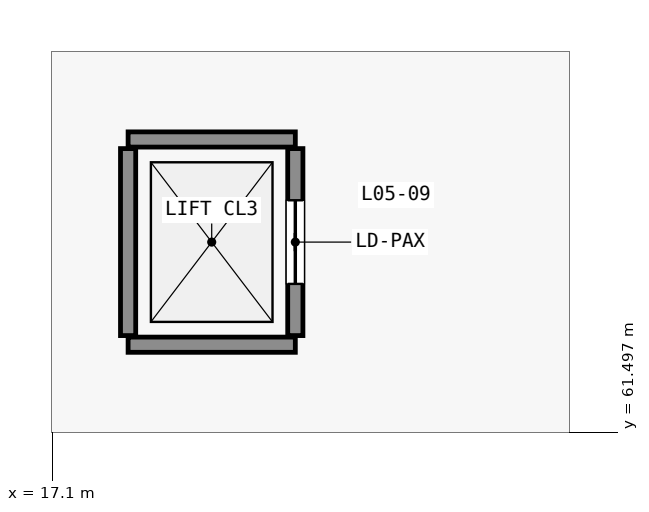
"""IFC4 building model, lengths in metres.
Left out: names, types, materials, properties, quantities, classifications, styles, units other than length and angle.
Written with IfcOpenShell. Run it as: python <this file> out.ifc"""

import sys

from ifc_helpers import new_model, si_unit, direction, frame, frame_2d, origin, place, context, subcontext, project, spatial, rectangle, extrude, element, fill, save


model = new_model("IFC4")
c1 = context("Model", 3, precision=1e-05, world=origin(), true_north=direction((0.0, 1.0)))
c2 = subcontext(c1, "Body", "Model", "MODEL_VIEW")
j1 = project(units=[si_unit("LENGTHUNIT", "METRE"), si_unit("PLANEANGLEUNIT", "RADIAN")], contexts=[c1])
p1 = place(None, origin())
s1 = spatial("IfcSite", under=j1, at=p1, CompositionType="ELEMENT")
p2 = place(p1, origin())
s2 = spatial("IfcBuilding", under=s1, at=p2, CompositionType="ELEMENT")
p3 = place(p2, frame((0.0, 0.0, 26.4)))
s3 = spatial("IfcBuildingStorey", under=s2, at=p3, CompositionType="ELEMENT", Elevation=26.4)
for number, where, z_axis, x_axis in (
    (1, (18.1, 62.65, 0.0), (0.0, 0.0, 1.0), (1.0, 0.0, 0.0)),
    (2, (18.1, 65.35, 0.0), (0.0, 0.0, 1.0), (1.0, 0.0, 0.0)),
):
    element("IfcWall", number, at=place(p3, frame(where, z_axis=z_axis, x_axis=x_axis)), inside=s3, PredefinedType="STANDARD", context=c2, shape_type="SweptSolid", body=[
        extrude(rectangle(XDim=2.2, YDim=0.2, at=frame_2d((1.1, 0.0))), origin(), (0.0, 0.0, 1.0), 5.18),
    ])
p4 = place(p3, frame((18.1, 62.77, 0.0), z_axis=(0.0, 0.0, 1.0), x_axis=(0.0, 1.0, 0.0)))
e3 = element("IfcWall", 3, at=p4, inside=s3, PredefinedType="STANDARD", context=c2, shape_type="SweptSolid", body=[
    extrude(rectangle(XDim=2.46, YDim=0.2, at=frame_2d((1.23, 0.0))), origin(), (0.0, 0.0, 1.0), 5.18),
])
p5 = place(p3, frame((20.3, 62.77, 0.0), z_axis=(0.0, 0.0, 1.0), x_axis=(0.0, 1.0, 0.0)))
e4 = element("IfcWall", 4, at=p5, inside=s3, PredefinedType="STANDARD", context=c2, shape_type="SweptSolid", body=[
    extrude(rectangle(XDim=2.46, YDim=0.2, at=frame_2d((1.23, 0.0))), origin(), (0.0, 0.0, 1.0), 5.18),
])
p6 = place(p5, frame((0.68, 0.0, 0.0)))
e5 = element("IfcOpeningElement", 5, at=p6, cuts=e4, PredefinedType="OPENING", context=c2, shape_type="SweptSolid", body=[
    extrude(rectangle(XDim=1.1, YDim=2.15, at=frame_2d((0.55, 1.075))), frame((0.0, 0.11, 0.0), z_axis=(0.0, -1.0, 0.0), x_axis=(1.0, 0.0, 0.0)), (0.0, 0.0, 1.0), 0.22),
])
p7 = place(p6, origin())
e6 = element("IfcDoor", 6, at=p7, inside=s3, OperationType="SLIDING_TO_LEFT", PredefinedType="DOOR", context=c2, shape_type="SweptSolid", body=[
    extrude(rectangle(XDim=1.1, YDim=2.15, at=frame_2d((0.55, 1.075))), frame((0.0, 0.025, 0.0), z_axis=(0.0, -1.0, 0.0), x_axis=(1.0, 0.0, 0.0)), (0.0, 0.0, 1.0), 0.05),
])
fill(e5, e6)
save(model, sys.argv[1])
